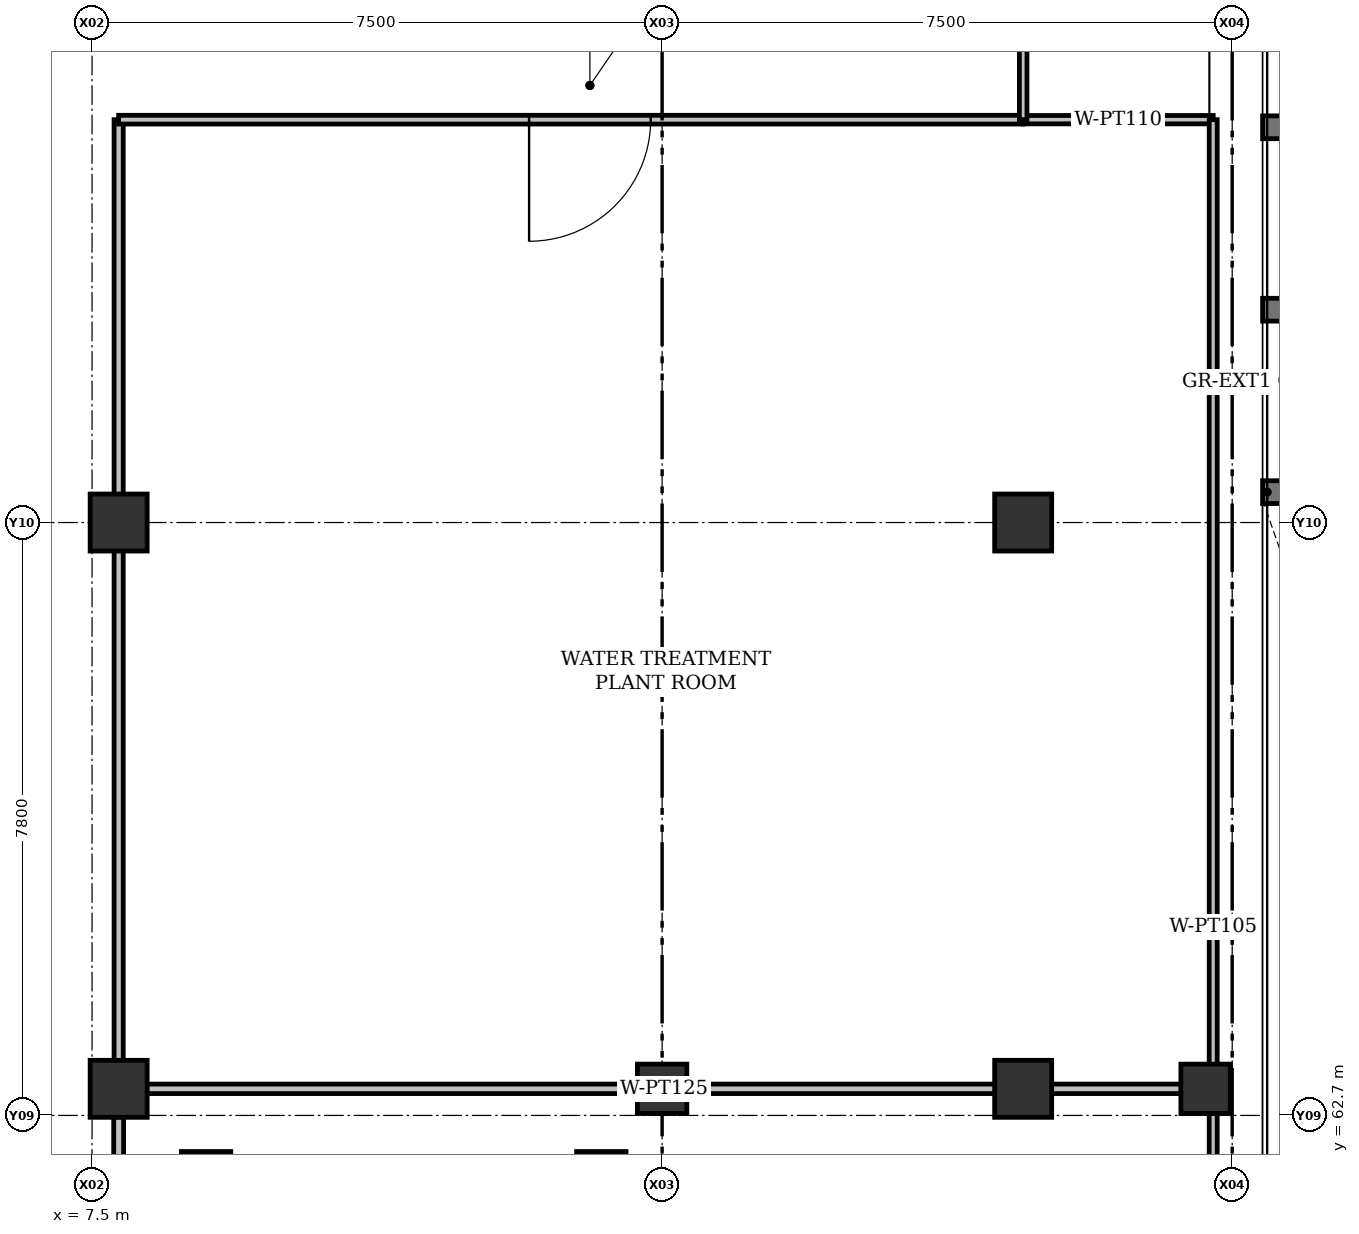
"""IFC4 building model, lengths in metres.
Left out: names, types, materials, properties, quantities, classifications, styles, units other than length and angle.
Written with IfcOpenShell. Run it as: python <this file> out.ifc"""

import sys

from ifc_helpers import new_model, si_unit, direction, frame, frame_2d, origin, origin_2d, place, context, subcontext, project, spatial, rectangle, extrude, element, fill, save


model = new_model("IFC4")
c1 = context("Model", 3, precision=1e-05, world=origin(), true_north=direction((0.0, 1.0)))
c2 = subcontext(c1, "Body", "Model", "MODEL_VIEW")
j1 = project(units=[si_unit("LENGTHUNIT", "METRE"), si_unit("PLANEANGLEUNIT", "RADIAN")], contexts=[c1])
p1 = place(None, origin())
s1 = spatial("IfcSite", under=j1, at=p1, CompositionType="ELEMENT")
p2 = place(p1, origin())
s2 = spatial("IfcBuilding", under=s1, at=p2, CompositionType="ELEMENT")
p3 = place(p2, frame((0.0, 0.0, -8.4)))
s3 = spatial("IfcBuildingStorey", under=s2, at=p3, CompositionType="ELEMENT", Elevation=-8.4)
for number, where, z_axis, x_axis in (
    (1, (7.85, 63.05, -0.3), (0.0, 0.0, 1.0), (1.0, 0.0, 0.0)),
    (2, (19.75, 63.05, -0.3), (0.0, 0.0, 1.0), (1.0, 0.0, 0.0)),
    (3, (7.85, 70.5, -0.3), (0.0, 0.0, 1.0), (1.0, 0.0, 0.0)),
    (4, (19.75, 70.5, -0.3), (0.0, 0.0, 1.0), (1.0, 0.0, 0.0)),
):
    element("IfcColumn", number, at=place(p3, frame(where, z_axis=z_axis, x_axis=x_axis)), inside=s3, PredefinedType="COLUMN", context=c2, shape_type="SweptSolid", body=[
        extrude(rectangle(XDim=0.75, YDim=0.75, at=origin_2d()), origin(), (0.0, 0.0, 1.0), 4.5),
    ])
for number, where, z_axis, x_axis in (
    (5, (15.0, 63.05, -0.3), (0.0, 0.0, 1.0), (1.0, 0.0, 0.0)),
    (6, (22.15, 63.05, -0.3), (0.0, 0.0, 1.0), (1.0, 0.0, 0.0)),
    (7, (9.0, 61.9, -0.3), (0.0, 0.0, 1.0), (1.0, 0.0, 0.0)),
    (8, (14.2, 61.9, -0.3), (0.0, 0.0, 1.0), (1.0, 0.0, 0.0)),
):
    element("IfcColumn", number, at=place(p3, frame(where, z_axis=z_axis, x_axis=x_axis)), inside=s3, PredefinedType="COLUMN", context=c2, shape_type="SweptSolid", body=[
        extrude(rectangle(XDim=0.65, YDim=0.65, at=origin_2d()), origin(), (0.0, 0.0, 1.0), 4.5),
    ])
p4 = place(p3, frame((22.9, 75.7, -0.3), z_axis=(0.0, 0.0, 1.0), x_axis=(1.0, 0.0, 0.0)))
e9 = element("IfcWall", 9, at=p4, inside=s3, PredefinedType="SHEAR", context=c2, shape_type="SweptSolid", body=[
    extrude(rectangle(XDim=5.8, YDim=0.3, at=frame_2d((2.9, 0.0))), origin(), (0.0, 0.0, 1.0), 2.14),
])
p5 = place(p3, frame((22.9, 73.3, -0.3), z_axis=(0.0, 0.0, 1.0), x_axis=(1.0, 0.0, 0.0)))
e10 = element("IfcWall", 10, at=p5, inside=s3, PredefinedType="SHEAR", context=c2, shape_type="SweptSolid", body=[
    extrude(rectangle(XDim=5.8, YDim=0.3, at=frame_2d((2.9, 0.0))), origin(), (0.0, 0.0, 1.0), 2.12),
])
p6 = place(p3, frame((22.9, 70.9, -0.3), z_axis=(0.0, 0.0, 1.0), x_axis=(1.0, 0.0, 0.0)))
e11 = element("IfcWall", 11, at=p6, inside=s3, PredefinedType="SHEAR", context=c2, shape_type="SweptSolid", body=[
    extrude(rectangle(XDim=5.8, YDim=0.3, at=frame_2d((2.9, 0.0))), origin(), (0.0, 0.0, 1.0), 2.135),
])
p7 = place(p3, frame((7.85, 54.57, 0.0), z_axis=(0.0, 0.0, 1.0), x_axis=(0.0, 1.0, 0.0)))
e12 = element("IfcWall", 12, at=p7, inside=s3, PredefinedType="PARTITIONING", context=c2, shape_type="SweptSolid", body=[
    extrude(rectangle(XDim=8.11, YDim=0.13, at=frame_2d((4.055, 0.0))), origin(), (0.0, 0.0, 1.0), 3.35),
])
p8 = place(p7, frame((3.235, 0.0, 0.0)))
e13 = element("IfcOpeningElement", 13, at=p8, cuts=e12, PredefinedType="OPENING", context=c2, shape_type="SweptSolid", body=[
    extrude(rectangle(XDim=1.45, YDim=2.2, at=frame_2d((0.725, 1.1))), frame((0.0, 0.065, 0.0), z_axis=(0.0, -1.0, 0.0), x_axis=(1.0, 0.0, 0.0)), (0.0, 0.0, 1.0), 0.13),
])
p9 = place(p3, frame((8.22, 63.05, 0.0), z_axis=(0.0, 0.0, 1.0), x_axis=(1.0, 0.0, 0.0)))
e14 = element("IfcWall", 14, at=p9, inside=s3, PredefinedType="PARTITIONING", context=c2, shape_type="SweptSolid", body=[
    extrude(rectangle(XDim=13.61, YDim=0.125, at=frame_2d((6.805, 0.0))), origin(), (0.0, 0.0, 1.0), 3.537),
])
p10 = place(p3, frame((7.85, 75.8, 0.0), z_axis=(0.0, 0.0, 1.0), x_axis=(0.0, -1.0, 0.0)))
e15 = element("IfcWall", 15, at=p10, inside=s3, PredefinedType="PARTITIONING", context=c2, shape_type="SweptSolid", body=[
    extrude(rectangle(XDim=12.38, YDim=0.12, at=frame_2d((6.19, 0.0))), origin(), (0.0, 0.0, 1.0), 3.487),
])
p11 = place(p3, frame((19.75, 75.8, 0.0), z_axis=(0.0, 0.0, 1.0), x_axis=(-1.0, 0.0, 0.0)))
e16 = element("IfcWall", 16, at=p11, inside=s3, PredefinedType="PARTITIONING", context=c2, shape_type="SweptSolid", body=[
    extrude(rectangle(XDim=11.9, YDim=0.115, at=frame_2d((5.95, 0.0))), origin(), (0.0, 0.0, 1.0), 3.487),
])
p12 = place(p11, frame((4.9, 0.0, 0.0)))
e17 = element("IfcOpeningElement", 17, at=p12, cuts=e16, PredefinedType="OPENING", context=c2, shape_type="SweptSolid", body=[
    extrude(rectangle(XDim=1.6, YDim=2.25, at=frame_2d((0.8, 1.125))), frame((0.0, 0.058, 0.0), z_axis=(0.0, -1.0, 0.0), x_axis=(1.0, 0.0, 0.0)), (0.0, 0.0, 1.0), 0.115),
])
p13 = place(p3, frame((22.25, 75.8, 0.0), z_axis=(0.0, 0.0, 1.0), x_axis=(-1.0, 0.0, 0.0)))
e18 = element("IfcWall", 18, at=p13, inside=s3, PredefinedType="PARTITIONING", context=c2, shape_type="SweptSolid", body=[
    extrude(rectangle(XDim=2.5, YDim=0.11, at=frame_2d((1.25, 0.0))), origin(), (0.0, 0.0, 1.0), 3.487),
])
p14 = place(p3, frame((22.25, 54.57, 0.0), z_axis=(0.0, 0.0, 1.0), x_axis=(0.0, 1.0, 0.0)))
e19 = element("IfcWall", 19, at=p14, inside=s3, PredefinedType="PARTITIONING", context=c2, shape_type="SweptSolid", body=[
    extrude(rectangle(XDim=21.23, YDim=0.105, at=frame_2d((10.615, 0.0))), origin(), (0.0, 0.0, 1.0), 3.95),
])
p15 = place(p3, frame((19.75, 92.03, 0.0), z_axis=(0.0, 0.0, 1.0), x_axis=(0.0, -1.0, 0.0)))
e20 = element("IfcWall", 20, at=p15, inside=s3, PredefinedType="PARTITIONING", context=c2, shape_type="SweptSolid", body=[
    extrude(rectangle(XDim=16.23, YDim=0.1, at=frame_2d((8.115, 0.0))), origin(), (0.0, 0.0, 1.0), 3.487),
])
p16 = place(p12, origin())
e21 = element("IfcDoor", 21, at=p16, inside=s3, OperationType="SINGLE_SWING_RIGHT", PredefinedType="DOOR", context=c2, shape_type="SweptSolid", body=[
    extrude(rectangle(XDim=1.6, YDim=2.25, at=frame_2d((0.8, 1.125))), frame((0.0, 0.025, 0.0), z_axis=(0.0, -1.0, 0.0), x_axis=(1.0, 0.0, 0.0)), (0.0, 0.0, 1.0), 0.05),
])
fill(e17, e21)
save(model, sys.argv[1])
